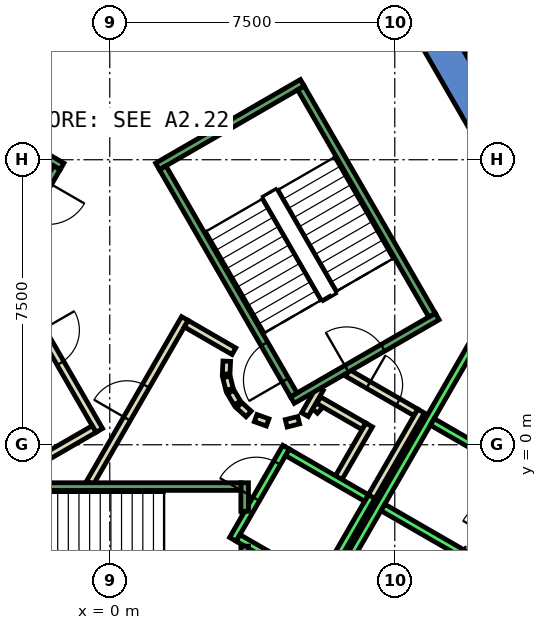
"""IFC4 building model, lengths in metres.
Left out: names, types, materials, properties, quantities, classifications, styles, units other than length and angle.
Written with IfcOpenShell. Run it as: python <this file> out.ifc"""

import sys

from ifc_helpers import new_model, si_unit, direction, frame, frame_2d, origin, place, context, subcontext, project, spatial, polyline, rectangle, outline, extrude, element, fill, save


model = new_model("IFC4")
c1 = context("Model", 3, precision=1e-05, world=origin(), true_north=direction((0.0, 1.0)))
c2 = subcontext(c1, "Body", "Model", "MODEL_VIEW")
j1 = project(units=[si_unit("LENGTHUNIT", "METRE"), si_unit("PLANEANGLEUNIT", "RADIAN")], contexts=[c1])
p1 = place(None, origin())
s1 = spatial("IfcSite", under=j1, at=p1, CompositionType="ELEMENT")
p2 = place(p1, origin())
s2 = spatial("IfcBuilding", under=s1, at=p2, CompositionType="ELEMENT")
p3 = place(p2, frame((0.0, 0.0, 107.6)))
s3 = spatial("IfcBuildingStorey", under=s2, at=p3, CompositionType="ELEMENT", Elevation=107.6)
p4 = place(p3, frame((0.0, 0.0, -0.4)))
e1 = element("IfcWall", 1, at=p4, inside=s3, PredefinedType="SHEAR", context=c2, shape_type="SweptSolid", body=[
    extrude(outline(polyline([(8.517, 11.748), (7.738, 11.298), (12.817, 2.5), (13.856, 2.5), (8.517, 11.748)])), origin(), (0.0, 0.0, 1.0), 4.2),
])
p5 = place(p3, frame((0.0, 0.0, -0.4)))
e2 = element("IfcWall", 2, at=p5, inside=s3, PredefinedType="SHEAR", context=c2, shape_type="SweptSolid", body=[
    extrude(outline(polyline([(10.717, -2.937), (9.938, -2.487), (9.288, -3.613), (10.067, -4.063), (10.717, -2.937)])), origin(), (0.0, 0.0, 1.0), 4.2),
])
p6 = place(p3, frame((5.39, 0.898, 0.0), z_axis=(0.0, 0.0, 1.0), x_axis=(0.673828488714, 0.738887791073, 0.0)))
e3 = element("IfcWall", 3, at=p6, inside=s3, PredefinedType="PARTITIONING", context=c2, shape_type="SweptSolid", body=[
    extrude(rectangle(XDim=0.263, YDim=0.2, at=frame_2d((0.131, 0.0))), origin(), (0.0, 0.0, 1.0), 3.8),
])
p7 = place(p3, frame((5.499, 1.172, 0.0), z_axis=(0.0, 0.0, 1.0), x_axis=(0.866333505267, -0.499465972466, 0.0)))
e4 = element("IfcWall", 4, at=p7, inside=s3, PredefinedType="PARTITIONING", context=c2, shape_type="SweptSolid", body=[
    extrude(rectangle(XDim=1.374, YDim=0.2, at=frame_2d((0.687, 0.0))), origin(), (0.0, 0.0, 1.0), 3.8),
])
p8 = place(p3, frame((6.826, 0.522, 0.0), z_axis=(0.0, 0.0, 1.0), x_axis=(-0.500016722714, -0.866015748706, 0.0)))
e5 = element("IfcWall", 5, at=p8, inside=s3, PredefinedType="PARTITIONING", context=c2, shape_type="SweptSolid", body=[
    extrude(rectangle(XDim=1.7, YDim=0.2, at=frame_2d((0.85, 0.0))), origin(), (0.0, 0.0, 1.0), 3.8),
])
p9 = place(p3, frame((6.25, 1.894, 0.0), z_axis=(0.0, 0.0, 1.0), x_axis=(0.866043184279, -0.499969202016, 0.0)))
e6 = element("IfcWall", 6, at=p9, inside=s3, PredefinedType="PARTITIONING", context=c2, shape_type="SweptSolid", body=[
    extrude(rectangle(XDim=2.084, YDim=0.2, at=frame_2d((1.042, 0.0))), origin(), (0.0, 0.0, 1.0), 3.8),
])
p10 = place(p9, frame((0.642, 0.0, 0.0)))
e7 = element("IfcOpeningElement", 7, at=p10, cuts=e6, PredefinedType="OPENING", context=c2, shape_type="SweptSolid", body=[
    extrude(rectangle(XDim=0.9, YDim=2.1, at=frame_2d((0.45, 1.05))), frame((0.0, 0.11, 0.0), z_axis=(0.0, -1.0, 0.0), x_axis=(1.0, 0.0, 0.0)), (0.0, 0.0, 1.0), 0.22),
])
p11 = place(p3, frame((8.192, 0.888, 0.0), z_axis=(0.0, 0.0, 1.0), x_axis=(-0.499940625693, -0.866059680843, 0.0)))
e8 = element("IfcWall", 8, at=p11, inside=s3, PredefinedType="PARTITIONING", context=c2, shape_type="SweptSolid", body=[
    extrude(rectangle(XDim=2.68, YDim=0.2, at=frame_2d((1.34, 0.0))), origin(), (0.0, 0.0, 1.0), 3.8),
])
p12 = place(p3, frame((5.135, 0.793, 0.0), z_axis=(0.0, 0.0, 1.0), x_axis=(0.499526442893, 0.866298639529, 0.0)))
e9 = element("IfcWall", 9, at=p12, inside=s3, PredefinedType="PARTITIONING", context=c2, shape_type="SweptSolid", body=[
    extrude(rectangle(XDim=0.791, YDim=0.2, at=frame_2d((0.396, 0.0))), origin(), (0.0, 0.0, 1.0), 3.8),
])
p13 = place(p3, frame((-0.52, -1.0, 0.0), z_axis=(0.0, 0.0, 1.0), x_axis=(0.50011622646, 0.865958290007, 0.0)))
e10 = element("IfcWall", 10, at=p13, inside=s3, PredefinedType="PARTITIONING", context=c2, shape_type="SweptSolid", body=[
    extrude(rectangle(XDim=4.991, YDim=0.2, at=frame_2d((2.496, 0.0))), origin(), (0.0, 0.0, 1.0), 3.8),
])
p14 = place(p13, frame((1.945, 0.0, 0.0)))
e11 = element("IfcOpeningElement", 11, at=p14, cuts=e10, PredefinedType="OPENING", context=c2, shape_type="SweptSolid", body=[
    extrude(rectangle(XDim=1.0, YDim=2.1, at=frame_2d((0.5, 1.05))), frame((0.0, 0.11, 0.0), z_axis=(0.0, -1.0, 0.0), x_axis=(1.0, 0.0, 0.0)), (0.0, 0.0, 1.0), 0.22),
])
p15 = place(p3, frame((2.012, 3.186, 0.0), z_axis=(0.0, 0.0, 1.0), x_axis=(0.865891012941, -0.500232699559, 0.0)))
e12 = element("IfcWall", 12, at=p15, inside=s3, PredefinedType="PARTITIONING", context=c2, shape_type="SweptSolid", body=[
    extrude(rectangle(XDim=1.449, YDim=0.2, at=frame_2d((0.725, 0.0))), origin(), (0.0, 0.0, 1.0), 3.8),
])
p16 = place(p3, frame((3.079, 2.199, 0.0), z_axis=(0.0, 0.0, 1.0), x_axis=(-0.047771483479, -0.998858290933, 0.0)))
e13 = element("IfcWall", 13, at=p16, inside=s3, PredefinedType="PARTITIONING", context=c2, shape_type="SweptSolid", body=[
    extrude(rectangle(XDim=0.337, YDim=0.2, at=frame_2d((0.169, 0.0))), origin(), (0.0, 0.0, 1.0), 3.8),
])
p17 = place(p3, frame((3.07, 1.786, 0.0), z_axis=(0.0, 0.0, 1.0), x_axis=(0.242705583207, -0.970099994784, 0.0)))
e14 = element("IfcWall", 14, at=p17, inside=s3, PredefinedType="PARTITIONING", context=c2, shape_type="SweptSolid", body=[
    extrude(rectangle(XDim=0.338, YDim=0.2, at=frame_2d((0.169, 0.0))), origin(), (0.0, 0.0, 1.0), 3.8),
])
for number, where, z_axis, x_axis in (
    (15, (3.182, 1.388, 0.0), (0.0, 0.0, 1.0), (0.512, -0.859, 0.0)),
    (16, (3.404, 1.039, 0.0), (0.0, 0.0, 1.0), (0.74, -0.672, 0.0)),
):
    element("IfcWall", number, at=place(p3, frame(where, z_axis=z_axis, x_axis=x_axis)), inside=s3, PredefinedType="PARTITIONING", context=c2, shape_type="SweptSolid", body=[
        extrude(rectangle(XDim=0.338, YDim=0.2, at=frame_2d((0.169, 0.0))), origin(), (0.0, 0.0, 1.0), 3.8),
    ])
p18 = place(p3, frame((3.838, 0.702, 0.0), z_axis=(0.0, 0.0, 1.0), x_axis=(0.941035081519, -0.338308993895, 0.0)))
e17 = element("IfcWall", 17, at=p18, inside=s3, PredefinedType="PARTITIONING", context=c2, shape_type="SweptSolid", body=[
    extrude(rectangle(XDim=0.337, YDim=0.2, at=frame_2d((0.168, 0.0))), origin(), (0.0, 0.0, 1.0), 3.8),
])
p19 = place(p3, frame((4.644, 0.564, 0.0), z_axis=(0.0, 0.0, 1.0), x_axis=(0.969929076366, 0.243387729394, 0.0)))
e18 = element("IfcWall", 18, at=p19, inside=s3, PredefinedType="PARTITIONING", context=c2, shape_type="SweptSolid", body=[
    extrude(rectangle(XDim=0.337, YDim=0.2, at=frame_2d((0.168, 0.0))), origin(), (0.0, 0.0, 1.0), 3.8),
])
p20 = place(p3, frame((-2.771, 4.7, 0.0), z_axis=(0.0, 0.0, 1.0), x_axis=(0.499969479948, -0.866043023828, 0.0)))
e19 = element("IfcWall", 19, at=p20, inside=s3, PredefinedType="PARTITIONING", context=c2, shape_type="SweptSolid", body=[
    extrude(rectangle(XDim=4.99, YDim=0.2, at=frame_2d((2.495, 0.0))), origin(), (0.0, 0.0, 1.0), 3.8),
])
p21 = place(p20, frame((1.945, 0.0, 0.0)))
e20 = element("IfcOpeningElement", 20, at=p21, cuts=e19, PredefinedType="OPENING", context=c2, shape_type="SweptSolid", body=[
    extrude(rectangle(XDim=1.0, YDim=2.1, at=frame_2d((0.5, 1.05))), frame((0.0, 0.11, 0.0), z_axis=(0.0, -1.0, 0.0), x_axis=(1.0, 0.0, 0.0)), (0.0, 0.0, 1.0), 0.22),
])
p22 = place(p3, frame((-0.412, 0.414, 0.0), z_axis=(0.0, 0.0, 1.0), x_axis=(-0.866017369001, -0.500013916395, 0.0)))
e21 = element("IfcWall", 21, at=p22, inside=s3, PredefinedType="PARTITIONING", context=c2, shape_type="SweptSolid", body=[
    extrude(rectangle(XDim=1.45, YDim=0.2, at=frame_2d((0.725, 0.0))), origin(), (0.0, 0.0, 1.0), 3.8),
])
p23 = place(p3, frame((3.24, -2.488, 0.0), z_axis=(0.0, 0.0, 1.0), x_axis=(0.49994636267, 0.866056369097, 0.0)))
e22 = element("IfcWall", 22, at=p23, inside=s3, PredefinedType="STANDARD", context=c2, shape_type="SweptSolid", body=[
    extrude(rectangle(XDim=2.8, YDim=0.2, at=frame_2d((1.4, 0.0))), origin(), (0.0, 0.0, 1.0), 3.8),
])
p24 = place(p23, frame((1.225, 0.0, 0.0)))
e23 = element("IfcOpeningElement", 23, at=p24, cuts=e22, PredefinedType="OPENING", context=c2, shape_type="SweptSolid", body=[
    extrude(rectangle(XDim=1.1, YDim=2.1, at=frame_2d((0.55, 1.05))), frame((0.0, 0.11, 0.0), z_axis=(0.0, -1.0, 0.0), x_axis=(1.0, 0.0, 0.0)), (0.0, 0.0, 1.0), 0.22),
])
p25 = place(p3, frame((5.492, -3.788, 0.0), z_axis=(0.0, 0.0, 1.0), x_axis=(0.500011755427, 0.866018616679, 0.0)))
e24 = element("IfcWall", 24, at=p25, inside=s3, PredefinedType="STANDARD", context=c2, shape_type="SweptSolid", body=[
    extrude(rectangle(XDim=2.8, YDim=0.2, at=frame_2d((1.4, 0.0))), origin(), (0.0, 0.0, 1.0), 3.8),
])
p26 = place(p3, frame((3.377, -2.452, 0.0), z_axis=(0.0, 0.0, 1.0), x_axis=(0.865955154139, -0.50012165622, 0.0)))
e25 = element("IfcWall", 25, at=p26, inside=s3, PredefinedType="STANDARD", context=c2, shape_type="SweptSolid", body=[
    extrude(rectangle(XDim=2.4, YDim=0.2, at=frame_2d((1.2, 0.0))), origin(), (0.0, 0.0, 1.0), 3.8),
])
p27 = place(p3, frame((4.677, -0.2, 0.0), z_axis=(0.0, 0.0, 1.0), x_axis=(0.865973769406, -0.500089422704, 0.0)))
e26 = element("IfcWall", 26, at=p27, inside=s3, PredefinedType="STANDARD", context=c2, shape_type="SweptSolid", body=[
    extrude(rectangle(XDim=2.399, YDim=0.2, at=frame_2d((1.2, 0.0))), origin(), (0.0, 0.0, 1.0), 3.8),
])
p28 = place(p3, frame((4.451, -6.19, 0.0), z_axis=(0.0, 0.0, 1.0), x_axis=(0.50000090737, 0.866024879913, 0.0)))
e27 = element("IfcWall", 27, at=p28, inside=s3, PredefinedType="STANDARD", context=c2, shape_type="SweptSolid", body=[
    extrude(rectangle(XDim=10.6, YDim=0.2, at=frame_2d((5.3, 0.0))), origin(), (0.0, 0.0, 1.0), 3.8),
])
for number, where, z_axis, x_axis in (
    (28, (7.188, -1.65, 0.0), (0.0, 0.0, 1.0), (0.866, -0.5, 0.0)),
    (29, (8.488, 0.602, 0.0), (0.0, 0.0, 1.0), (0.866, -0.5, 0.0)),
):
    element("IfcWall", number, at=place(p3, frame(where, z_axis=z_axis, x_axis=x_axis)), inside=s3, PredefinedType="STANDARD", context=c2, shape_type="SweptSolid", body=[
        extrude(rectangle(XDim=2.5, YDim=0.2, at=frame_2d((1.25, 0.0))), origin(), (0.0, 0.0, 1.0), 3.8),
    ])
p29 = place(p3, frame((3.55, -2.667, 0.0), z_axis=(0.0, 0.0, 1.0), x_axis=(0.0, -1.0, 0.0)))
e30 = element("IfcWall", 30, at=p29, inside=s3, PredefinedType="STANDARD", context=c2, shape_type="SweptSolid", body=[
    extrude(rectangle(XDim=2.733, YDim=0.2, at=frame_2d((1.366, 0.0))), origin(), (0.0, 0.0, 1.0), 3.8),
])
p30 = place(p3, frame((3.55, -1.0, 0.0), z_axis=(0.0, 0.0, 1.0), x_axis=(0.0, -1.0, 0.0)))
e31 = element("IfcWall", 31, at=p30, inside=s3, PredefinedType="STANDARD", context=c2, shape_type="SweptSolid", body=[
    extrude(rectangle(XDim=0.751, YDim=0.2, at=frame_2d((0.375, 0.0))), origin(), (0.0, 0.0, 1.0), 3.8),
])
p31 = place(p3, frame((-3.45, -1.1, 0.0), z_axis=(0.0, 0.0, 1.0), x_axis=(1.0, 0.0, 0.0)))
e32 = element("IfcWall", 32, at=p31, inside=s3, PredefinedType="STANDARD", context=c2, shape_type="SweptSolid", body=[
    extrude(rectangle(XDim=6.9, YDim=0.2, at=frame_2d((3.45, 0.0))), origin(), (0.0, 0.0, 1.0), 3.8),
])
p32 = place(p31, frame((0.45, 0.0, 0.0)))
e33 = element("IfcOpeningElement", 33, at=p32, cuts=e32, PredefinedType="OPENING", context=c2, shape_type="SweptSolid", body=[
    extrude(rectangle(XDim=1.1, YDim=2.2, at=frame_2d((0.55, 1.1))), frame((0.0, 0.11, 0.0), z_axis=(0.0, -1.0, 0.0), x_axis=(1.0, 0.0, 0.0)), (0.0, 0.0, 1.0), 0.22),
])
p33 = place(p3, frame((4.806, 1.176, 0.0), z_axis=(0.0, 0.0, 1.0), x_axis=(0.866059941101, 0.499940174841, 0.0)))
e34 = element("IfcWall", 34, at=p33, inside=s3, PredefinedType="STANDARD", context=c2, shape_type="SweptSolid", body=[
    extrude(rectangle(XDim=4.4, YDim=0.2, at=frame_2d((2.2, 0.0))), origin(), (0.0, 0.0, 1.0), 3.8),
])
p34 = place(p33, frame((1.65, 0.0, 0.0)))
e35 = element("IfcOpeningElement", 35, at=p34, cuts=e34, PredefinedType="OPENING", context=c2, shape_type="SweptSolid", body=[
    extrude(rectangle(XDim=1.1, YDim=2.2, at=frame_2d((0.55, 1.1))), frame((0.0, 0.11, 0.0), z_axis=(0.0, -1.0, 0.0), x_axis=(1.0, 0.0, 0.0)), (0.0, 0.0, 1.0), 0.22),
])
p35 = place(p3, frame((1.256, 7.324, 0.0), z_axis=(0.0, 0.0, 1.0), x_axis=(0.866046073146, 0.499964197906, 0.0)))
e36 = element("IfcWall", 36, at=p35, inside=s3, PredefinedType="STANDARD", context=c2, shape_type="SweptSolid", body=[
    extrude(rectangle(XDim=4.4, YDim=0.2, at=frame_2d((2.2, 0.0))), origin(), (0.0, 0.0, 1.0), 3.8),
])
p36 = place(p3, frame((4.843, 1.312, 0.0), z_axis=(0.0, 0.0, 1.0), x_axis=(-0.499963383562, 0.866046543262, 0.0)))
e37 = element("IfcWall", 37, at=p36, inside=s3, PredefinedType="STANDARD", context=c2, shape_type="SweptSolid", body=[
    extrude(rectangle(XDim=6.9, YDim=0.2, at=frame_2d((3.45, 0.0))), origin(), (0.0, 0.0, 1.0), 3.8),
])
p37 = place(p36, frame((0.45, 0.0, 0.0)))
e38 = element("IfcOpeningElement", 38, at=p37, cuts=e37, PredefinedType="OPENING", context=c2, shape_type="SweptSolid", body=[
    extrude(rectangle(XDim=1.1, YDim=2.2, at=frame_2d((0.55, 1.1))), frame((0.0, 0.11, 0.0), z_axis=(0.0, -1.0, 0.0), x_axis=(1.0, 0.0, 0.0)), (0.0, 0.0, 1.0), 0.22),
])
p38 = place(p3, frame((8.48, 3.412, 0.0), z_axis=(0.0, 0.0, 1.0), x_axis=(-0.499978703459, 0.866037698999, 0.0)))
e39 = element("IfcWall", 39, at=p38, inside=s3, PredefinedType="STANDARD", context=c2, shape_type="SweptSolid", body=[
    extrude(rectangle(XDim=6.9, YDim=0.2, at=frame_2d((3.45, 0.0))), origin(), (0.0, 0.0, 1.0), 3.8),
])
p39 = place(p3, frame((-1.256, 7.324, 0.0), z_axis=(0.0, 0.0, 1.0), x_axis=(-0.866046073146, 0.499964197906, 0.0)))
e40 = element("IfcWall", 40, at=p39, inside=s3, PredefinedType="STANDARD", context=c2, shape_type="SweptSolid", body=[
    extrude(rectangle(XDim=4.4, YDim=0.2, at=frame_2d((2.2, 0.0))), origin(), (0.0, 0.0, 1.0), 3.8),
])
p40 = place(p39, frame((1.65, 0.0, 0.0)))
e41 = element("IfcOpeningElement", 41, at=p40, cuts=e40, PredefinedType="OPENING", context=c2, shape_type="SweptSolid", body=[
    extrude(rectangle(XDim=1.1, YDim=2.2, at=frame_2d((0.55, 1.1))), frame((0.0, 0.11, 0.0), z_axis=(0.0, -1.0, 0.0), x_axis=(1.0, 0.0, 0.0)), (0.0, 0.0, 1.0), 0.22),
])
p41 = place(p3, frame((-1.393, 7.288, 0.0), z_axis=(0.0, 0.0, 1.0), x_axis=(-0.499963383562, -0.866046543262, 0.0)))
e42 = element("IfcWall", 42, at=p41, inside=s3, PredefinedType="STANDARD", context=c2, shape_type="SweptSolid", body=[
    extrude(rectangle(XDim=6.9, YDim=0.2, at=frame_2d((3.45, 0.0))), origin(), (0.0, 0.0, 1.0), 3.8),
])
p42 = place(p41, frame((0.45, 0.0, 0.0)))
e43 = element("IfcOpeningElement", 43, at=p42, cuts=e42, PredefinedType="OPENING", context=c2, shape_type="SweptSolid", body=[
    extrude(rectangle(XDim=1.1, YDim=2.2, at=frame_2d((0.55, 1.1))), frame((0.0, 0.11, 0.0), z_axis=(0.0, -1.0, 0.0), x_axis=(1.0, 0.0, 0.0)), (0.0, 0.0, 1.0), 0.22),
])
p43 = place(p14, origin())
e44 = element("IfcDoor", 44, at=p43, inside=s3, OperationType="SINGLE_SWING_LEFT", PredefinedType="DOOR", context=c2, shape_type="SweptSolid", body=[
    extrude(rectangle(XDim=1.0, YDim=2.1, at=frame_2d((0.5, 1.05))), frame((0.0, 0.025, 0.0), z_axis=(0.0, -1.0, 0.0), x_axis=(1.0, 0.0, 0.0)), (0.0, 0.0, 1.0), 0.05),
])
fill(e11, e44)
p44 = place(p21, origin())
e45 = element("IfcDoor", 45, at=p44, inside=s3, OperationType="SINGLE_SWING_RIGHT", PredefinedType="DOOR", context=c2, shape_type="SweptSolid", body=[
    extrude(rectangle(XDim=1.0, YDim=2.1, at=frame_2d((0.5, 1.05))), frame((0.0, 0.025, 0.0), z_axis=(0.0, -1.0, 0.0), x_axis=(1.0, 0.0, 0.0)), (0.0, 0.0, 1.0), 0.05),
])
fill(e20, e45)
p45 = place(p10, origin())
e46 = element("IfcDoor", 46, at=p45, inside=s3, OperationType="SINGLE_SWING_LEFT", PredefinedType="DOOR", context=c2, shape_type="SweptSolid", body=[
    extrude(rectangle(XDim=0.9, YDim=2.1, at=frame_2d((0.45, 1.05))), frame((0.0, 0.025, 0.0), z_axis=(0.0, -1.0, 0.0), x_axis=(1.0, 0.0, 0.0)), (0.0, 0.0, 1.0), 0.05),
])
fill(e7, e46)
p46 = place(p24, origin())
e47 = element("IfcDoor", 47, at=p46, inside=s3, OperationType="SLIDING_TO_LEFT", PredefinedType="DOOR", context=c2, shape_type="SweptSolid", body=[
    extrude(rectangle(XDim=1.1, YDim=2.1, at=frame_2d((0.55, 1.05))), frame((0.0, 0.025, 0.0), z_axis=(0.0, -1.0, 0.0), x_axis=(1.0, 0.0, 0.0)), (0.0, 0.0, 1.0), 0.05),
])
fill(e23, e47)
p47 = place(p37, origin())
e48 = element("IfcDoor", 48, at=p47, inside=s3, OperationType="SINGLE_SWING_LEFT", PredefinedType="DOOR", context=c2, shape_type="SweptSolid", body=[
    extrude(rectangle(XDim=1.1, YDim=2.2, at=frame_2d((0.55, 1.1))), frame((0.0, 0.025, 0.0), z_axis=(0.0, -1.0, 0.0), x_axis=(1.0, 0.0, 0.0)), (0.0, 0.0, 1.0), 0.05),
])
fill(e38, e48)
p48 = place(p34, origin())
e49 = element("IfcDoor", 49, at=p48, inside=s3, OperationType="SINGLE_SWING_LEFT", PredefinedType="DOOR", context=c2, shape_type="SweptSolid", body=[
    extrude(rectangle(XDim=1.1, YDim=2.2, at=frame_2d((0.55, 1.1))), frame((0.0, 0.025, 0.0), z_axis=(0.0, -1.0, 0.0), x_axis=(1.0, 0.0, 0.0)), (0.0, 0.0, 1.0), 0.05),
])
fill(e35, e49)
save(model, sys.argv[1])
